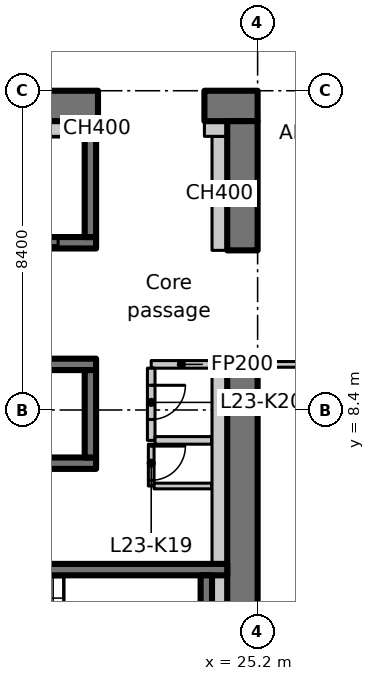
"""IFC4 building model, lengths in metres.
Left out: names, types, materials, properties, quantities, classifications, styles, units other than length and angle.
Written with IfcOpenShell. Run it as: python <this file> out.ifc"""

import sys

from ifc_helpers import new_model, si_unit, direction, frame, frame_2d, origin, place, context, subcontext, project, spatial, rectangle, extrude, element, fill, save


model = new_model("IFC4")
c1 = context("Model", 3, precision=1e-05, world=origin(), true_north=direction((0.0, 1.0)))
c2 = subcontext(c1, "Body", "Model", "MODEL_VIEW")
j1 = project(units=[si_unit("LENGTHUNIT", "METRE"), si_unit("PLANEANGLEUNIT", "RADIAN")], contexts=[c1])
p1 = place(None, origin())
s1 = spatial("IfcSite", under=j1, at=p1, CompositionType="ELEMENT")
p2 = place(p1, origin())
s2 = spatial("IfcBuilding", under=s1, at=p2, CompositionType="ELEMENT")
p3 = place(p2, frame((0.0, 0.0, 98.9)))
s3 = spatial("IfcBuildingStorey", under=s2, at=p3, CompositionType="ELEMENT", Elevation=98.9)
p4 = place(p3, frame((-1.1, 16.4, 0.0), z_axis=(0.0, 0.0, 1.0), x_axis=(1.0, 0.0, 0.0)))
e1 = element("IfcWall", 1, at=p4, inside=s3, PredefinedType="SHEAR", context=c2, shape_type="SweptSolid", body=[
    extrude(rectangle(XDim=22.1, YDim=0.8, at=frame_2d((11.05, 0.0))), origin(), (0.0, 0.0, 1.0), 3.35),
])
p5 = place(p4, frame((3.15, 0.0, 0.0)))
e2 = element("IfcOpeningElement", 2, at=p5, cuts=e1, PredefinedType="OPENING", context=c2, shape_type="SweptSolid", body=[
    extrude(rectangle(XDim=1.1, YDim=2.3, at=frame_2d((0.55, 1.15))), frame((0.0, 0.41, 0.0), z_axis=(0.0, -1.0, 0.0), x_axis=(1.0, 0.0, 0.0)), (0.0, 0.0, 1.0), 0.82),
])
p6 = place(p3, frame((23.8, 16.4, 0.0), z_axis=(0.0, 0.0, 1.0), x_axis=(1.0, 0.0, 0.0)))
e3 = element("IfcWall", 3, at=p6, inside=s3, PredefinedType="SHEAR", context=c2, shape_type="SweptSolid", body=[
    extrude(rectangle(XDim=1.4, YDim=0.8, at=frame_2d((0.7, 0.0))), origin(), (0.0, 0.0, 1.0), 3.35),
])
p7 = place(p3, frame((24.8, 0.8, 0.0), z_axis=(0.0, 0.0, 1.0), x_axis=(0.0, 1.0, 0.0)))
e4 = element("IfcWall", 4, at=p7, inside=s3, PredefinedType="SHEAR", context=c2, shape_type="SweptSolid", body=[
    extrude(rectangle(XDim=9.0, YDim=0.8, at=frame_2d((4.5, 0.0))), origin(), (0.0, 0.0, 1.0), 3.35),
])
p8 = place(p3, frame((24.8, 12.6, 0.0), z_axis=(0.0, 0.0, 1.0), x_axis=(0.0, 1.0, 0.0)))
e5 = element("IfcWall", 5, at=p8, inside=s3, PredefinedType="SHEAR", context=c2, shape_type="SweptSolid", body=[
    extrude(rectangle(XDim=3.4, YDim=0.8, at=frame_2d((1.7, 0.0))), origin(), (0.0, 0.0, 1.0), 3.35),
])
p9 = place(p3, frame((24.2, 12.6, 0.0), z_axis=(0.0, 0.0, 1.0), x_axis=(0.0, 1.0, 0.0)))
e6 = element("IfcWall", 6, at=p9, inside=s3, PredefinedType="PARTITIONING", context=c2, shape_type="SweptSolid", body=[
    extrude(rectangle(XDim=3.0, YDim=0.4, at=frame_2d((1.5, 0.0))), origin(), (0.0, 0.0, 1.0), 3.35),
])
p10 = place(p3, frame((23.8, 15.8, 0.0), z_axis=(0.0, 0.0, 1.0), x_axis=(1.0, 0.0, 0.0)))
e7 = element("IfcWall", 7, at=p10, inside=s3, PredefinedType="PARTITIONING", context=c2, shape_type="SweptSolid", body=[
    extrude(rectangle(XDim=0.6, YDim=0.4, at=frame_2d((0.3, 0.0))), origin(), (0.0, 0.0, 1.0), 3.35),
])
p11 = place(p3, frame((0.8, 7.0, 0.0), z_axis=(0.0, 0.0, 1.0), x_axis=(1.0, 0.0, 0.0)))
e8 = element("IfcWall", 8, at=p11, inside=s3, PredefinedType="SHEAR", context=c2, shape_type="SweptSolid", body=[
    extrude(rectangle(XDim=20.15, YDim=0.3, at=frame_2d((10.075, 0.0))), origin(), (0.0, 0.0, 1.0), 3.35),
])
p12 = place(p3, frame((0.8, 9.6, 0.0), z_axis=(0.0, 0.0, 1.0), x_axis=(1.0, 0.0, 0.0)))
e9 = element("IfcWall", 9, at=p12, inside=s3, PredefinedType="SHEAR", context=c2, shape_type="SweptSolid", body=[
    extrude(rectangle(XDim=20.15, YDim=0.3, at=frame_2d((10.075, 0.0))), origin(), (0.0, 0.0, 1.0), 3.35),
])
p13 = place(p12, frame((1.25, 0.0, 0.0)))
e10 = element("IfcOpeningElement", 10, at=p13, cuts=e9, PredefinedType="OPENING", context=c2, shape_type="SweptSolid", body=[
    extrude(rectangle(XDim=1.1, YDim=2.3, at=frame_2d((0.55, 1.15))), frame((0.0, 0.16, 0.0), z_axis=(0.0, -1.0, 0.0), x_axis=(1.0, 0.0, 0.0)), (0.0, 0.0, 1.0), 0.32),
])
p14 = place(p12, frame((4.05, 0.0, 0.0)))
e11 = element("IfcOpeningElement", 11, at=p14, cuts=e9, PredefinedType="OPENING", context=c2, shape_type="SweptSolid", body=[
    extrude(rectangle(XDim=1.1, YDim=2.3, at=frame_2d((0.55, 1.15))), frame((0.0, 0.16, 0.0), z_axis=(0.0, -1.0, 0.0), x_axis=(1.0, 0.0, 0.0)), (0.0, 0.0, 1.0), 0.32),
])
p15 = place(p12, frame((6.85, 0.0, 0.0)))
e12 = element("IfcOpeningElement", 12, at=p15, cuts=e9, PredefinedType="OPENING", context=c2, shape_type="SweptSolid", body=[
    extrude(rectangle(XDim=1.1, YDim=2.3, at=frame_2d((0.55, 1.15))), frame((0.0, 0.16, 0.0), z_axis=(0.0, -1.0, 0.0), x_axis=(1.0, 0.0, 0.0)), (0.0, 0.0, 1.0), 0.32),
])
p16 = place(p12, frame((9.65, 0.0, 0.0)))
e13 = element("IfcOpeningElement", 13, at=p16, cuts=e9, PredefinedType="OPENING", context=c2, shape_type="SweptSolid", body=[
    extrude(rectangle(XDim=1.1, YDim=2.3, at=frame_2d((0.55, 1.15))), frame((0.0, 0.16, 0.0), z_axis=(0.0, -1.0, 0.0), x_axis=(1.0, 0.0, 0.0)), (0.0, 0.0, 1.0), 0.32),
])
p17 = place(p12, frame((12.45, 0.0, 0.0)))
e14 = element("IfcOpeningElement", 14, at=p17, cuts=e9, PredefinedType="OPENING", context=c2, shape_type="SweptSolid", body=[
    extrude(rectangle(XDim=1.1, YDim=2.3, at=frame_2d((0.55, 1.15))), frame((0.0, 0.16, 0.0), z_axis=(0.0, -1.0, 0.0), x_axis=(1.0, 0.0, 0.0)), (0.0, 0.0, 1.0), 0.32),
])
p18 = place(p12, frame((15.25, 0.0, 0.0)))
e15 = element("IfcOpeningElement", 15, at=p18, cuts=e9, PredefinedType="OPENING", context=c2, shape_type="SweptSolid", body=[
    extrude(rectangle(XDim=1.1, YDim=2.3, at=frame_2d((0.55, 1.15))), frame((0.0, 0.16, 0.0), z_axis=(0.0, -1.0, 0.0), x_axis=(1.0, 0.0, 0.0)), (0.0, 0.0, 1.0), 0.32),
])
p19 = place(p3, frame((20.8, 7.15, 0.0), z_axis=(0.0, 0.0, 1.0), x_axis=(0.0, 1.0, 0.0)))
e16 = element("IfcWall", 16, at=p19, inside=s3, PredefinedType="SHEAR", context=c2, shape_type="SweptSolid", body=[
    extrude(rectangle(XDim=2.3, YDim=0.3, at=frame_2d((1.15, 0.0))), origin(), (0.0, 0.0, 1.0), 3.35),
])
p20 = place(p3, frame((15.05, 12.8, 0.0), z_axis=(0.0, 0.0, 1.0), x_axis=(1.0, 0.0, 0.0)))
e17 = element("IfcWall", 17, at=p20, inside=s3, PredefinedType="SHEAR", context=c2, shape_type="SweptSolid", body=[
    extrude(rectangle(XDim=5.9, YDim=0.3, at=frame_2d((2.95, 0.0))), origin(), (0.0, 0.0, 1.0), 3.35),
])
p21 = place(p20, frame((3.8, 0.0, 0.0)))
e18 = element("IfcOpeningElement", 18, at=p21, cuts=e17, PredefinedType="OPENING", context=c2, shape_type="SweptSolid", body=[
    extrude(rectangle(XDim=1.1, YDim=2.3, at=frame_2d((0.55, 1.15))), frame((0.0, 0.16, 0.0), z_axis=(0.0, -1.0, 0.0), x_axis=(1.0, 0.0, 0.0)), (0.0, 0.0, 1.0), 0.32),
])
p22 = place(p3, frame((20.8, 12.95, 0.0), z_axis=(0.0, 0.0, 1.0), x_axis=(0.0, 1.0, 0.0)))
e19 = element("IfcWall", 19, at=p22, inside=s3, PredefinedType="SHEAR", context=c2, shape_type="SweptSolid", body=[
    extrude(rectangle(XDim=3.05, YDim=0.3, at=frame_2d((1.525, 0.0))), origin(), (0.0, 0.0, 1.0), 3.35),
])
p23 = place(p3, frame((15.8, 4.2, 0.0), z_axis=(0.0, 0.0, 1.0), x_axis=(1.0, 0.0, 0.0)))
e20 = element("IfcWall", 20, at=p23, inside=s3, PredefinedType="SHEAR", context=c2, shape_type="SweptSolid", body=[
    extrude(rectangle(XDim=8.6, YDim=0.3, at=frame_2d((4.3, 0.0))), origin(), (0.0, 0.0, 1.0), 3.35),
])
p24 = place(p23, frame((0.4, 0.0, 0.0)))
e21 = element("IfcOpeningElement", 21, at=p24, cuts=e20, PredefinedType="OPENING", context=c2, shape_type="SweptSolid", body=[
    extrude(rectangle(XDim=1.0, YDim=2.1, at=frame_2d((0.5, 1.05))), frame((0.0, 0.16, 0.0), z_axis=(0.0, -1.0, 0.0), x_axis=(1.0, 0.0, 0.0)), (0.0, 0.0, 1.0), 0.32),
])
p25 = place(p3, frame((23.85, 1.5, 0.0), z_axis=(0.0, 0.0, 1.0), x_axis=(0.0, 1.0, 0.0)))
e22 = element("IfcWall", 22, at=p25, inside=s3, PredefinedType="SHEAR", context=c2, shape_type="SweptSolid", body=[
    extrude(rectangle(XDim=2.55, YDim=0.3, at=frame_2d((1.275, 0.0))), origin(), (0.0, 0.0, 1.0), 3.35),
])
p26 = place(p3, frame((23.988, 9.6, 0.0), z_axis=(0.0, 0.0, 1.0), x_axis=(-1.0, 0.0, 0.0)))
e23 = element("IfcWall", 23, at=p26, inside=s3, PredefinedType="PARTITIONING", context=c2, shape_type="SweptSolid", body=[
    extrude(rectangle(XDim=1.588, YDim=0.2, at=frame_2d((0.794, 0.0))), origin(), (0.0, 0.0, 1.0), 3.35),
])
p27 = place(p3, frame((22.4, 9.5, 0.0), z_axis=(0.0, 0.0, 1.0), x_axis=(0.0, -1.0, 0.0)))
e24 = element("IfcWall", 24, at=p27, inside=s3, PredefinedType="PARTITIONING", context=c2, shape_type="SweptSolid", body=[
    extrude(rectangle(XDim=1.9, YDim=0.2, at=frame_2d((0.95, 0.0))), origin(), (0.0, 0.0, 1.0), 3.35),
])
p28 = place(p27, frame((0.45, 0.0, 0.0)))
e25 = element("IfcOpeningElement", 25, at=p28, cuts=e24, PredefinedType="OPENING", context=c2, shape_type="SweptSolid", body=[
    extrude(rectangle(XDim=0.9, YDim=2.1, at=frame_2d((0.45, 1.05))), frame((0.0, 0.11, 0.0), z_axis=(0.0, -1.0, 0.0), x_axis=(1.0, 0.0, 0.0)), (0.0, 0.0, 1.0), 0.22),
])
p29 = place(p3, frame((22.5, 7.6, 0.0), z_axis=(0.0, 0.0, 1.0), x_axis=(1.0, 0.0, 0.0)))
e26 = element("IfcWall", 26, at=p29, inside=s3, PredefinedType="PARTITIONING", context=c2, shape_type="SweptSolid", body=[
    extrude(rectangle(XDim=1.488, YDim=0.2, at=frame_2d((0.744, 0.0))), origin(), (0.0, 0.0, 1.0), 3.35),
])
p30 = place(p3, frame((22.4, 7.5, 0.0), z_axis=(0.0, 0.0, 1.0), x_axis=(0.0, -1.0, 0.0)))
e27 = element("IfcWall", 27, at=p30, inside=s3, PredefinedType="PARTITIONING", context=c2, shape_type="SweptSolid", body=[
    extrude(rectangle(XDim=1.1, YDim=0.15, at=frame_2d((0.55, 0.0))), origin(), (0.0, 0.0, 1.0), 3.35),
])
p31 = place(p30, frame((0.05, 0.0, 0.0)))
e28 = element("IfcOpeningElement", 28, at=p31, cuts=e27, PredefinedType="OPENING", context=c2, shape_type="SweptSolid", body=[
    extrude(rectangle(XDim=0.9, YDim=2.1, at=frame_2d((0.45, 1.05))), frame((0.0, 0.085, 0.0), z_axis=(0.0, -1.0, 0.0), x_axis=(1.0, 0.0, 0.0)), (0.0, 0.0, 1.0), 0.17),
])
p32 = place(p3, frame((22.475, 6.4, 0.0), z_axis=(0.0, 0.0, 1.0), x_axis=(1.0, 0.0, 0.0)))
e29 = element("IfcWall", 29, at=p32, inside=s3, PredefinedType="PARTITIONING", context=c2, shape_type="SweptSolid", body=[
    extrude(rectangle(XDim=1.513, YDim=0.15, at=frame_2d((0.756, 0.0))), origin(), (0.0, 0.0, 1.0), 3.35),
])
p33 = place(p3, frame((18.15, 15.8, 0.0), z_axis=(0.0, 0.0, 1.0), x_axis=(1.0, 0.0, 0.0)))
e30 = element("IfcWall", 30, at=p33, inside=s3, PredefinedType="PARTITIONING", context=c2, shape_type="SweptSolid", body=[
    extrude(rectangle(XDim=2.5, YDim=0.4, at=frame_2d((1.25, 0.0))), origin(), (0.0, 0.0, 1.0), 3.35),
])
p34 = place(p3, frame((20.95, 15.8, 0.0), z_axis=(0.0, 0.0, 1.0), x_axis=(1.0, 0.0, 0.0)))
e31 = element("IfcWall", 31, at=p34, inside=s3, PredefinedType="PARTITIONING", context=c2, shape_type="SweptSolid", body=[
    extrude(rectangle(XDim=0.05, YDim=0.4, at=frame_2d((0.025, 0.0))), origin(), (0.0, 0.0, 1.0), 3.35),
])
p35 = place(p3, frame((24.2, 1.5, 0.0), z_axis=(0.0, 0.0, 1.0), x_axis=(0.0, 1.0, 0.0)))
e32 = element("IfcWall", 32, at=p35, inside=s3, PredefinedType="PARTITIONING", context=c2, shape_type="SweptSolid", body=[
    extrude(rectangle(XDim=2.55, YDim=0.4, at=frame_2d((1.275, 0.0))), origin(), (0.0, 0.0, 1.0), 3.35),
])
p36 = place(p3, frame((24.2, 4.35, 0.0), z_axis=(0.0, 0.0, 1.0), x_axis=(0.0, 1.0, 0.0)))
e33 = element("IfcWall", 33, at=p36, inside=s3, PredefinedType="PARTITIONING", context=c2, shape_type="SweptSolid", body=[
    extrude(rectangle(XDim=5.45, YDim=0.4, at=frame_2d((2.725, 0.0))), origin(), (0.0, 0.0, 1.0), 3.35),
])
p37 = place(p3, frame((29.4, 9.6, 0.0), z_axis=(0.0, 0.0, 1.0), x_axis=(-1.0, 0.0, 0.0)))
e34 = element("IfcWall", 34, at=p37, inside=s3, PredefinedType="PARTITIONING", context=c2, shape_type="SweptSolid", body=[
    extrude(rectangle(XDim=4.2, YDim=0.15, at=frame_2d((2.1, 0.0))), origin(), (0.0, 0.0, 1.0), 3.33),
])
p38 = place(p21, origin())
e35 = element("IfcDoor", 35, at=p38, inside=s3, OperationType="SLIDING_TO_LEFT", PredefinedType="DOOR", context=c2, shape_type="SweptSolid", body=[
    extrude(rectangle(XDim=1.1, YDim=2.3, at=frame_2d((0.55, 1.15))), frame((0.0, 0.025, 0.0), z_axis=(0.0, -1.0, 0.0), x_axis=(1.0, 0.0, 0.0)), (0.0, 0.0, 1.0), 0.05),
])
fill(e18, e35)
p39 = place(p31, origin())
e36 = element("IfcDoor", 36, at=p39, inside=s3, OperationType="SINGLE_SWING_LEFT", PredefinedType="DOOR", context=c2, shape_type="SweptSolid", body=[
    extrude(rectangle(XDim=0.9, YDim=2.1, at=frame_2d((0.45, 1.05))), frame((0.0, 0.025, 0.0), z_axis=(0.0, -1.0, 0.0), x_axis=(1.0, 0.0, 0.0)), (0.0, 0.0, 1.0), 0.05),
])
fill(e28, e36)
p40 = place(p28, origin())
e37 = element("IfcDoor", 37, at=p40, inside=s3, OperationType="SINGLE_SWING_RIGHT", PredefinedType="DOOR", context=c2, shape_type="SweptSolid", body=[
    extrude(rectangle(XDim=0.9, YDim=2.1, at=frame_2d((0.45, 1.05))), frame((0.0, 0.025, 0.0), z_axis=(0.0, -1.0, 0.0), x_axis=(1.0, 0.0, 0.0)), (0.0, 0.0, 1.0), 0.05),
])
fill(e25, e37)
save(model, sys.argv[1])
